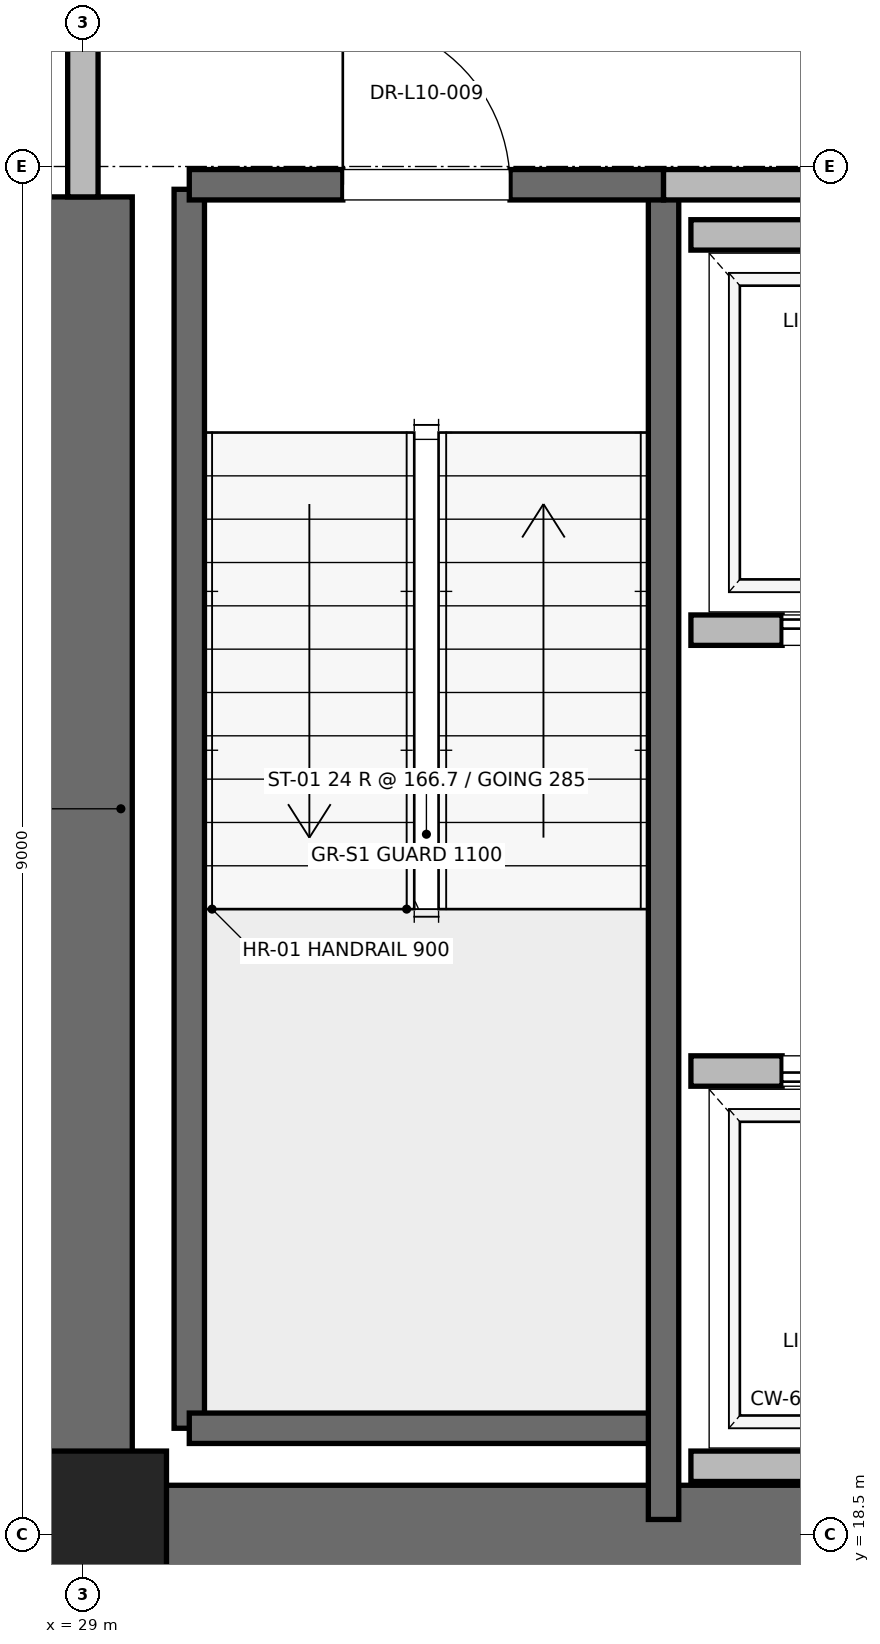
"""IFC4 building model, lengths in metres.
Left out: names, types, materials, properties, quantities, classifications, styles, units other than length and angle.
Written with IfcOpenShell. Run it as: python <this file> out.ifc"""

import sys

from ifc_helpers import new_model, si_unit, direction, frame, frame_2d, origin, origin_2d, place, context, subcontext, project, spatial, rectangle, extrude, element, fill, save


model = new_model("IFC4")
c1 = context("Model", 3, precision=1e-05, world=origin(), true_north=direction((0.0, 1.0)))
c2 = subcontext(c1, "Body", "Model", "MODEL_VIEW")
j1 = project(units=[si_unit("LENGTHUNIT", "METRE"), si_unit("PLANEANGLEUNIT", "RADIAN")], contexts=[c1])
p1 = place(None, origin())
s1 = spatial("IfcSite", under=j1, at=p1, CompositionType="ELEMENT")
p2 = place(p1, origin())
s2 = spatial("IfcBuilding", under=s1, at=p2, CompositionType="ELEMENT")
p3 = place(p2, frame((0.0, 0.0, 47.6)))
s3 = spatial("IfcBuildingStorey", under=s2, at=p3, CompositionType="ELEMENT", Elevation=47.6)
p4 = place(p3, frame((29.0, 18.5, 0.0), z_axis=(0.0, 0.0, 1.0), x_axis=(1.0, 0.0, 0.0)))
e1 = element("IfcColumn", 1, at=p4, inside=s3, PredefinedType="PILASTER", context=c2, shape_type="SweptSolid", body=[
    extrude(rectangle(XDim=1.1, YDim=1.1, at=origin_2d()), origin(), (0.0, 0.0, 1.0), 4.0),
])
p5 = place(p3, frame((29.0, 18.5, 0.0), z_axis=(0.0, 0.0, 1.0), x_axis=(1.0, 0.0, 0.0)))
e2 = element("IfcWall", 2, at=p5, inside=s3, PredefinedType="SHEAR", context=c2, shape_type="SweptSolid", body=[
    extrude(rectangle(XDim=9.2, YDim=0.65, at=frame_2d((4.6, 0.0))), origin(), (0.0, 0.0, 1.0), 3.76),
])
p6 = place(p3, frame((29.0, 18.5, 0.0), z_axis=(0.0, 0.0, 1.0), x_axis=(0.0, 1.0, 0.0)))
e3 = element("IfcWall", 3, at=p6, inside=s3, PredefinedType="SHEAR", context=c2, shape_type="SweptSolid", body=[
    extrude(rectangle(XDim=8.8, YDim=0.65, at=frame_2d((4.4, 0.0))), origin(), (0.0, 0.0, 1.0), 3.76),
])
p7 = place(p3, frame((29.7, 19.2, 0.0), z_axis=(0.0, 0.0, 1.0), x_axis=(0.0, 1.0, 0.0)))
e4 = element("IfcWall", 4, at=p7, inside=s3, PredefinedType="SOLIDWALL", context=c2, shape_type="SweptSolid", body=[
    extrude(rectangle(XDim=8.15, YDim=0.2, at=frame_2d((4.075, 0.0))), origin(), (0.0, 0.0, 1.0), 3.76),
])
p8 = place(p3, frame((29.7, 19.2, 0.0), z_axis=(0.0, 0.0, 1.0), x_axis=(1.0, 0.0, 0.0)))
e5 = element("IfcWall", 5, at=p8, inside=s3, PredefinedType="SOLIDWALL", context=c2, shape_type="SweptSolid", body=[
    extrude(rectangle(XDim=3.12, YDim=0.2, at=frame_2d((1.56, 0.0))), origin(), (0.0, 0.0, 1.0), 3.76),
])
p9 = place(p3, frame((32.82, 18.6, 0.0), z_axis=(0.0, 0.0, 1.0), x_axis=(0.0, 1.0, 0.0)))
e6 = element("IfcWall", 6, at=p9, inside=s3, PredefinedType="SOLIDWALL", context=c2, shape_type="SweptSolid", body=[
    extrude(rectangle(XDim=8.78, YDim=0.2, at=frame_2d((4.39, 0.0))), origin(), (0.0, 0.0, 1.0), 3.76),
])
p10 = place(p3, frame((29.7, 27.38, 0.0), z_axis=(0.0, 0.0, 1.0), x_axis=(1.0, 0.0, 0.0)))
e7 = element("IfcWall", 7, at=p10, inside=s3, PredefinedType="SOLIDWALL", context=c2, shape_type="SweptSolid", body=[
    extrude(rectangle(XDim=3.12, YDim=0.2, at=frame_2d((1.56, 0.0))), origin(), (0.0, 0.0, 1.0), 3.76),
])
p11 = place(p10, frame((1.01, 0.0, 0.0)))
e8 = element("IfcOpeningElement", 8, at=p11, cuts=e7, PredefinedType="OPENING", context=c2, shape_type="SweptSolid", body=[
    extrude(rectangle(XDim=1.1, YDim=2.15, at=frame_2d((0.55, 1.075))), frame((0.0, 0.1, 0.0), z_axis=(0.0, -1.0, 0.0), x_axis=(1.0, 0.0, 0.0)), (0.0, 0.0, 1.0), 0.2),
])
p12 = place(p3, frame((29.0, 27.3, 0.0), z_axis=(0.0, 0.0, 1.0), x_axis=(0.0, 1.0, 0.0)))
e9 = element("IfcWall", 9, at=p12, inside=s3, PredefinedType="PARTITIONING", context=c2, shape_type="SweptSolid", body=[
    extrude(rectangle(XDim=3.4, YDim=0.2, at=frame_2d((1.7, 0.0))), origin(), (0.0, 0.0, 1.0), 2.54),
])
p13 = place(p12, frame((1.125, 0.0, 0.0)))
e10 = element("IfcOpeningElement", 10, at=p13, cuts=e9, PredefinedType="OPENING", context=c2, shape_type="SweptSolid", body=[
    extrude(rectangle(XDim=1.15, YDim=2.2, at=frame_2d((0.575, 1.1))), frame((0.0, 0.1, 0.0), z_axis=(0.0, -1.0, 0.0), x_axis=(1.0, 0.0, 0.0)), (0.0, 0.0, 1.0), 0.2),
])
p14 = place(p3, frame((32.82, 27.38, 0.0), z_axis=(0.0, 0.0, 1.0), x_axis=(1.0, 0.0, 0.0)))
e11 = element("IfcWall", 11, at=p14, inside=s3, PredefinedType="PARTITIONING", context=c2, shape_type="SweptSolid", body=[
    extrude(rectangle(XDim=5.62, YDim=0.2, at=frame_2d((2.81, 0.0))), origin(), (0.0, 0.0, 1.0), 3.76),
])
p15 = place(p3, frame((33.0, 18.95, 0.0), z_axis=(0.0, 0.0, 1.0), x_axis=(1.0, 0.0, 0.0)))
e12 = element("IfcWall", 12, at=p15, inside=s3, PredefinedType="SOLIDWALL", context=c2, shape_type="SweptSolid", body=[
    extrude(rectangle(XDim=2.3, YDim=0.2, at=frame_2d((1.15, 0.0))), origin(), (0.0, 0.0, 1.0), 3.76),
])
p16 = place(p3, frame((35.3, 21.55, 0.0), z_axis=(0.0, 0.0, 1.0), x_axis=(-1.0, 0.0, 0.0)))
e13 = element("IfcWall", 13, at=p16, inside=s3, PredefinedType="SOLIDWALL", context=c2, shape_type="SweptSolid", body=[
    extrude(rectangle(XDim=2.3, YDim=0.2, at=frame_2d((1.15, 0.0))), origin(), (0.0, 0.0, 1.0), 3.76),
])
p17 = place(p16, frame((0.6, 0.0, 0.0)))
e14 = element("IfcOpeningElement", 14, at=p17, cuts=e13, PredefinedType="OPENING", context=c2, shape_type="SweptSolid", body=[
    extrude(rectangle(XDim=1.1, YDim=2.2, at=frame_2d((0.55, 1.1))), frame((0.0, 0.1, 0.0), z_axis=(0.0, -1.0, 0.0), x_axis=(1.0, 0.0, 0.0)), (0.0, 0.0, 1.0), 0.2),
])
p18 = place(p3, frame((33.0, 24.45, 0.0), z_axis=(0.0, 0.0, 1.0), x_axis=(1.0, 0.0, 0.0)))
e15 = element("IfcWall", 15, at=p18, inside=s3, PredefinedType="SOLIDWALL", context=c2, shape_type="SweptSolid", body=[
    extrude(rectangle(XDim=2.3, YDim=0.2, at=frame_2d((1.15, 0.0))), origin(), (0.0, 0.0, 1.0), 3.76),
])
p19 = place(p18, frame((0.6, 0.0, 0.0)))
e16 = element("IfcOpeningElement", 16, at=p19, cuts=e15, PredefinedType="OPENING", context=c2, shape_type="SweptSolid", body=[
    extrude(rectangle(XDim=1.1, YDim=2.2, at=frame_2d((0.55, 1.1))), frame((0.0, 0.1, 0.0), z_axis=(0.0, -1.0, 0.0), x_axis=(1.0, 0.0, 0.0)), (0.0, 0.0, 1.0), 0.2),
])
p20 = place(p3, frame((35.3, 27.05, 0.0), z_axis=(0.0, 0.0, 1.0), x_axis=(-1.0, 0.0, 0.0)))
e17 = element("IfcWall", 17, at=p20, inside=s3, PredefinedType="SOLIDWALL", context=c2, shape_type="SweptSolid", body=[
    extrude(rectangle(XDim=2.3, YDim=0.2, at=frame_2d((1.15, 0.0))), origin(), (0.0, 0.0, 1.0), 3.76),
])
p21 = place(p11, origin())
e18 = element("IfcDoor", 18, at=p21, inside=s3, OperationType="SINGLE_SWING_LEFT", PredefinedType="DOOR", context=c2, shape_type="SweptSolid", body=[
    extrude(rectangle(XDim=1.1, YDim=2.15, at=frame_2d((0.55, 1.075))), frame((0.0, 0.025, 0.0), z_axis=(0.0, -1.0, 0.0), x_axis=(1.0, 0.0, 0.0)), (0.0, 0.0, 1.0), 0.05),
])
fill(e8, e18)
p22 = place(p17, origin())
e19 = element("IfcDoor", 19, at=p22, inside=s3, OperationType="SLIDING_TO_RIGHT", PredefinedType="DOOR", context=c2, shape_type="SweptSolid", body=[
    extrude(rectangle(XDim=1.1, YDim=2.2, at=frame_2d((0.55, 1.1))), frame((0.0, 0.025, 0.0), z_axis=(0.0, -1.0, 0.0), x_axis=(1.0, 0.0, 0.0)), (0.0, 0.0, 1.0), 0.05),
])
fill(e14, e19)
p23 = place(p19, origin())
e20 = element("IfcDoor", 20, at=p23, inside=s3, OperationType="SLIDING_TO_RIGHT", PredefinedType="DOOR", context=c2, shape_type="SweptSolid", body=[
    extrude(rectangle(XDim=1.1, YDim=2.2, at=frame_2d((0.55, 1.1))), frame((0.0, 0.025, 0.0), z_axis=(0.0, -1.0, 0.0), x_axis=(1.0, 0.0, 0.0)), (0.0, 0.0, 1.0), 0.05),
])
fill(e16, e20)
save(model, sys.argv[1])
